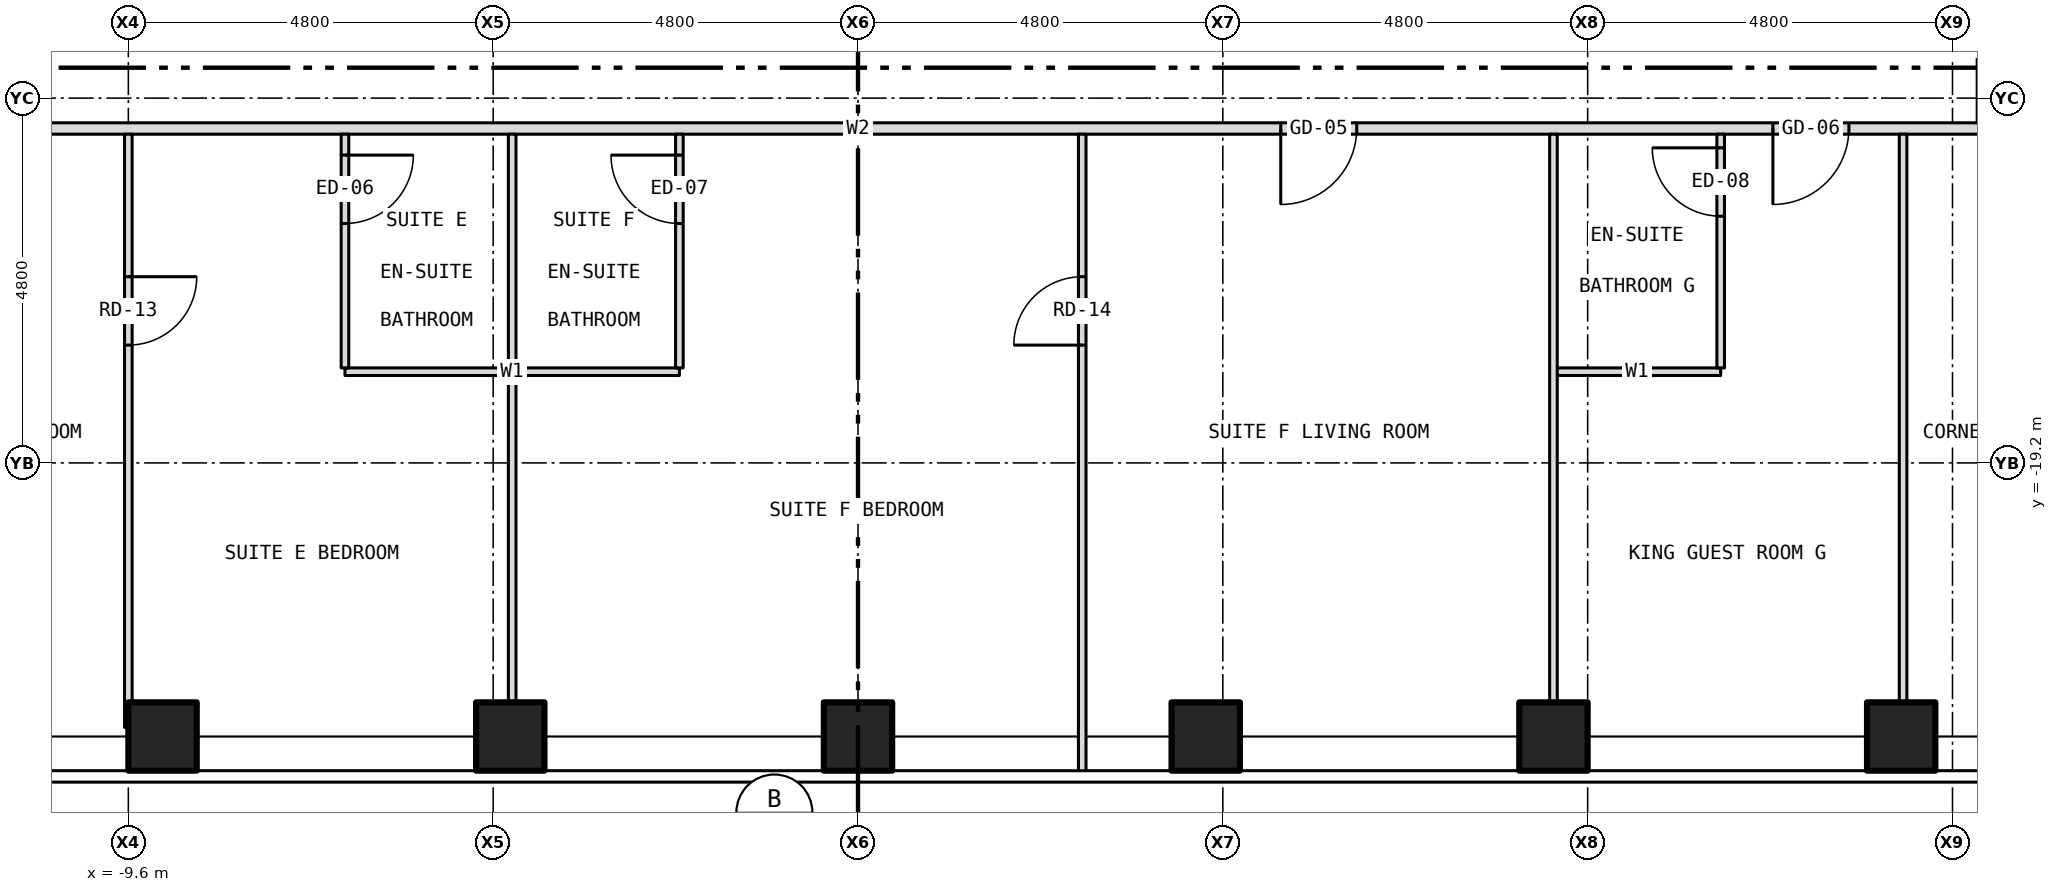
"""IFC4 building model, lengths in metres.
Left out: names, types, materials, properties, quantities, classifications, styles, units other than length and angle.
Written with IfcOpenShell. Run it as: python <this file> out.ifc"""

import sys

from ifc_helpers import new_model, si_unit, direction, frame, frame_2d, origin, origin_2d, place, context, subcontext, project, spatial, rectangle, hollow_rectangle, extrude, element, fill, save


model = new_model("IFC4")
c1 = context("Model", 3, precision=1e-05, world=origin(), true_north=direction((0.0, 1.0)))
c2 = subcontext(c1, "Body", "Model", "MODEL_VIEW")
j1 = project(units=[si_unit("LENGTHUNIT", "METRE"), si_unit("PLANEANGLEUNIT", "RADIAN")], contexts=[c1])
p1 = place(None, origin())
s1 = spatial("IfcSite", under=j1, at=p1, CompositionType="ELEMENT")
p2 = place(p1, origin())
s2 = spatial("IfcBuilding", under=s1, at=p2, CompositionType="ELEMENT")
p3 = place(p2, frame((0.0, 0.0, 106.5)))
s3 = spatial("IfcBuildingStorey", under=s2, at=p3, CompositionType="ELEMENT", Elevation=106.5)
for number, where, z_axis, x_axis in (
    (1, (-9.15, -22.8, -0.15), (0.0, 0.0, 1.0), (1.0, 0.0, 0.0)),
    (2, (-4.575, -22.8, -0.15), (0.0, 0.0, 1.0), (1.0, 0.0, 0.0)),
    (3, (0.0, -22.8, -0.15), (0.0, 0.0, 1.0), (1.0, 0.0, 0.0)),
    (4, (4.575, -22.8, -0.15), (0.0, 0.0, 1.0), (1.0, 0.0, 0.0)),
    (5, (9.15, -22.8, -0.15), (0.0, 0.0, 1.0), (1.0, 0.0, 0.0)),
    (6, (13.725, -22.8, -0.15), (0.0, 0.0, 1.0), (1.0, 0.0, 0.0)),
):
    element("IfcColumn", number, at=place(p3, frame(where, z_axis=z_axis, x_axis=x_axis)), inside=s3, PredefinedType="COLUMN", context=c2, shape_type="SweptSolid", body=[
        extrude(hollow_rectangle(XDim=0.9, YDim=0.9, WallThickness=0.05, at=origin_2d()), origin(), (0.0, 0.0, 1.0), 3.5),
    ])
p4 = place(p3, frame((-6.75, -18.0, 0.0), z_axis=(0.0, 0.0, 1.0), x_axis=(1.0, 0.0, 0.0)))
e7 = element("IfcWall", 7, at=p4, inside=s3, PredefinedType="PARTITIONING", context=c2, shape_type="SweptSolid", body=[
    extrude(rectangle(XDim=4.4, YDim=0.1, at=frame_2d((2.2, 0.0))), origin(), (0.0, 0.0, 1.0), 3.35),
])
p5 = place(p3, frame((9.15, -18.0, 0.0), z_axis=(0.0, 0.0, 1.0), x_axis=(1.0, 0.0, 0.0)))
e8 = element("IfcWall", 8, at=p5, inside=s3, PredefinedType="PARTITIONING", context=c2, shape_type="SweptSolid", body=[
    extrude(rectangle(XDim=2.2, YDim=0.1, at=frame_2d((1.1, 0.0))), origin(), (0.0, 0.0, 1.0), 3.35),
])
p6 = place(p3, frame((-14.8, -14.8, 0.0), z_axis=(0.0, 0.0, 1.0), x_axis=(1.0, 0.0, 0.0)))
e9 = element("IfcWall", 9, at=p6, inside=s3, PredefinedType="PARTITIONING", context=c2, shape_type="SweptSolid", body=[
    extrude(rectangle(XDim=29.6, YDim=0.15, at=frame_2d((14.8, 0.0))), origin(), (0.0, 0.0, 1.0), 3.35),
])
p7 = place(p6, frame((2.634, 0.0, 0.0)))
e10 = element("IfcOpeningElement", 10, at=p7, cuts=e9, PredefinedType="OPENING", context=c2, shape_type="SweptSolid", body=[
    extrude(rectangle(XDim=1.0, YDim=2.1, at=frame_2d((0.5, 1.05))), frame((0.0, 0.087, 0.0), z_axis=(0.0, -1.0, 0.0), x_axis=(1.0, 0.0, 0.0)), (0.0, 0.0, 1.0), 0.174),
])
p8 = place(p6, frame((20.362, 0.0, 0.0)))
e11 = element("IfcOpeningElement", 11, at=p8, cuts=e9, PredefinedType="OPENING", context=c2, shape_type="SweptSolid", body=[
    extrude(rectangle(XDim=1.0, YDim=2.1, at=frame_2d((0.5, 1.05))), frame((0.0, 0.087, 0.0), z_axis=(0.0, -1.0, 0.0), x_axis=(1.0, 0.0, 0.0)), (0.0, 0.0, 1.0), 0.174),
])
p9 = place(p6, frame((26.837, 0.0, 0.0)))
e12 = element("IfcOpeningElement", 12, at=p9, cuts=e9, PredefinedType="OPENING", context=c2, shape_type="SweptSolid", body=[
    extrude(rectangle(XDim=1.0, YDim=2.1, at=frame_2d((0.5, 1.05))), frame((0.0, 0.087, 0.0), z_axis=(0.0, -1.0, 0.0), x_axis=(1.0, 0.0, 0.0)), (0.0, 0.0, 1.0), 0.174),
])
p10 = place(p3, frame((-9.6, -22.68, 0.0), z_axis=(0.0, 0.0, 1.0), x_axis=(0.0, 1.0, 0.0)))
e13 = element("IfcWall", 13, at=p10, inside=s3, PredefinedType="PARTITIONING", context=c2, shape_type="SweptSolid", body=[
    extrude(rectangle(XDim=0.33, YDim=0.1, at=frame_2d((0.165, 0.0))), origin(), (0.0, 0.0, 1.0), 3.35),
])
p11 = place(p3, frame((-9.6, -22.35, 0.0), z_axis=(0.0, 0.0, 1.0), x_axis=(0.0, 1.0, 0.0)))
e14 = element("IfcWall", 14, at=p11, inside=s3, PredefinedType="PARTITIONING", context=c2, shape_type="SweptSolid", body=[
    extrude(rectangle(XDim=7.475, YDim=0.1, at=frame_2d((3.738, 0.0))), origin(), (0.0, 0.0, 1.0), 2.728),
])
p12 = place(p11, frame((4.7, 0.0, 0.0)))
e15 = element("IfcOpeningElement", 15, at=p12, cuts=e14, PredefinedType="OPENING", context=c2, shape_type="SweptSolid", body=[
    extrude(rectangle(XDim=0.9, YDim=2.1, at=frame_2d((0.45, 1.05))), frame((0.0, 0.062, 0.0), z_axis=(0.0, -1.0, 0.0), x_axis=(1.0, 0.0, 0.0)), (0.0, 0.0, 1.0), 0.124),
])
p13 = place(p3, frame((-6.75, -17.95, 0.0), z_axis=(0.0, 0.0, 1.0), x_axis=(0.0, 1.0, 0.0)))
e16 = element("IfcWall", 16, at=p13, inside=s3, PredefinedType="PARTITIONING", context=c2, shape_type="SweptSolid", body=[
    extrude(rectangle(XDim=3.075, YDim=0.1, at=frame_2d((1.538, 0.0))), origin(), (0.0, 0.0, 1.0), 3.35),
])
p14 = place(p13, frame((1.9, 0.0, 0.0)))
e17 = element("IfcOpeningElement", 17, at=p14, cuts=e16, PredefinedType="OPENING", context=c2, shape_type="SweptSolid", body=[
    extrude(rectangle(XDim=0.9, YDim=2.1, at=frame_2d((0.45, 1.05))), frame((0.0, 0.062, 0.0), z_axis=(0.0, -1.0, 0.0), x_axis=(1.0, 0.0, 0.0)), (0.0, 0.0, 1.0), 0.124),
])
p15 = place(p3, frame((-4.55, -22.68, 0.0), z_axis=(0.0, 0.0, 1.0), x_axis=(0.0, 1.0, 0.0)))
e18 = element("IfcWall", 18, at=p15, inside=s3, PredefinedType="PARTITIONING", context=c2, shape_type="SweptSolid", body=[
    extrude(rectangle(XDim=4.63, YDim=0.1, at=frame_2d((2.315, 0.0))), origin(), (0.0, 0.0, 1.0), 3.35),
])
p16 = place(p3, frame((-4.55, -17.95, 0.0), z_axis=(0.0, 0.0, 1.0), x_axis=(0.0, 1.0, 0.0)))
e19 = element("IfcWall", 19, at=p16, inside=s3, PredefinedType="PARTITIONING", context=c2, shape_type="SweptSolid", body=[
    extrude(rectangle(XDim=3.075, YDim=0.1, at=frame_2d((1.538, 0.0))), origin(), (0.0, 0.0, 1.0), 3.35),
])
p17 = place(p3, frame((-2.35, -17.95, 0.0), z_axis=(0.0, 0.0, 1.0), x_axis=(0.0, 1.0, 0.0)))
e20 = element("IfcWall", 20, at=p17, inside=s3, PredefinedType="PARTITIONING", context=c2, shape_type="SweptSolid", body=[
    extrude(rectangle(XDim=3.075, YDim=0.1, at=frame_2d((1.538, 0.0))), origin(), (0.0, 0.0, 1.0), 3.35),
])
p18 = place(p17, frame((1.9, 0.0, 0.0)))
e21 = element("IfcOpeningElement", 21, at=p18, cuts=e20, PredefinedType="OPENING", context=c2, shape_type="SweptSolid", body=[
    extrude(rectangle(XDim=0.9, YDim=2.1, at=frame_2d((0.45, 1.05))), frame((0.0, 0.062, 0.0), z_axis=(0.0, -1.0, 0.0), x_axis=(1.0, 0.0, 0.0)), (0.0, 0.0, 1.0), 0.124),
])
p19 = place(p3, frame((2.95, -23.28, 0.0), z_axis=(0.0, 0.0, 1.0), x_axis=(0.0, 1.0, 0.0)))
e22 = element("IfcWall", 22, at=p19, inside=s3, PredefinedType="PARTITIONING", context=c2, shape_type="SweptSolid", body=[
    extrude(rectangle(XDim=8.405, YDim=0.1, at=frame_2d((4.203, 0.0))), origin(), (0.0, 0.0, 1.0), 3.35),
])
p20 = place(p19, frame((5.63, 0.0, 0.0)))
e23 = element("IfcOpeningElement", 23, at=p20, cuts=e22, PredefinedType="OPENING", context=c2, shape_type="SweptSolid", body=[
    extrude(rectangle(XDim=0.9, YDim=2.1, at=frame_2d((0.45, 1.05))), frame((0.0, 0.062, 0.0), z_axis=(0.0, -1.0, 0.0), x_axis=(1.0, 0.0, 0.0)), (0.0, 0.0, 1.0), 0.124),
])
p21 = place(p3, frame((9.15, -22.68, 0.0), z_axis=(0.0, 0.0, 1.0), x_axis=(0.0, 1.0, 0.0)))
e24 = element("IfcWall", 24, at=p21, inside=s3, PredefinedType="PARTITIONING", context=c2, shape_type="SweptSolid", body=[
    extrude(rectangle(XDim=7.805, YDim=0.1, at=frame_2d((3.902, 0.0))), origin(), (0.0, 0.0, 1.0), 3.35),
])
p22 = place(p3, frame((11.35, -17.95, 0.0), z_axis=(0.0, 0.0, 1.0), x_axis=(0.0, 1.0, 0.0)))
e25 = element("IfcWall", 25, at=p22, inside=s3, PredefinedType="PARTITIONING", context=c2, shape_type="SweptSolid", body=[
    extrude(rectangle(XDim=3.075, YDim=0.1, at=frame_2d((1.538, 0.0))), origin(), (0.0, 0.0, 1.0), 3.35),
])
p23 = place(p22, frame((1.996, 0.0, 0.0)))
e26 = element("IfcOpeningElement", 26, at=p23, cuts=e25, PredefinedType="OPENING", context=c2, shape_type="SweptSolid", body=[
    extrude(rectangle(XDim=0.9, YDim=2.1, at=frame_2d((0.45, 1.05))), frame((0.0, 0.062, 0.0), z_axis=(0.0, -1.0, 0.0), x_axis=(1.0, 0.0, 0.0)), (0.0, 0.0, 1.0), 0.124),
])
p24 = place(p3, frame((13.75, -22.68, 0.0), z_axis=(0.0, 0.0, 1.0), x_axis=(0.0, 1.0, 0.0)))
e27 = element("IfcWall", 27, at=p24, inside=s3, PredefinedType="PARTITIONING", context=c2, shape_type="SweptSolid", body=[
    extrude(rectangle(XDim=7.805, YDim=0.1, at=frame_2d((3.902, 0.0))), origin(), (0.0, 0.0, 1.0), 3.35),
])
p25 = place(p12, origin())
e28 = element("IfcDoor", 28, at=p25, inside=s3, OperationType="SINGLE_SWING_RIGHT", PredefinedType="DOOR", context=c2, shape_type="SweptSolid", body=[
    extrude(rectangle(XDim=0.9, YDim=2.1, at=frame_2d((0.45, 1.05))), frame((0.0, 0.025, 0.0), z_axis=(0.0, -1.0, 0.0), x_axis=(1.0, 0.0, 0.0)), (0.0, 0.0, 1.0), 0.05),
])
fill(e15, e28)
p26 = place(p14, origin())
e29 = element("IfcDoor", 29, at=p26, inside=s3, OperationType="SINGLE_SWING_RIGHT", PredefinedType="DOOR", context=c2, shape_type="SweptSolid", body=[
    extrude(rectangle(XDim=0.9, YDim=2.1, at=frame_2d((0.45, 1.05))), frame((0.0, 0.025, 0.0), z_axis=(0.0, -1.0, 0.0), x_axis=(1.0, 0.0, 0.0)), (0.0, 0.0, 1.0), 0.05),
])
fill(e17, e29)
p27 = place(p8, origin())
e30 = element("IfcDoor", 30, at=p27, inside=s3, OperationType="SINGLE_SWING_LEFT", PredefinedType="DOOR", context=c2, shape_type="SweptSolid", body=[
    extrude(rectangle(XDim=1.0, YDim=2.1, at=frame_2d((0.5, 1.05))), frame((0.0, 0.025, 0.0), z_axis=(0.0, -1.0, 0.0), x_axis=(1.0, 0.0, 0.0)), (0.0, 0.0, 1.0), 0.05),
])
fill(e11, e30)
p28 = place(p20, origin())
e31 = element("IfcDoor", 31, at=p28, inside=s3, OperationType="SINGLE_SWING_LEFT", PredefinedType="DOOR", context=c2, shape_type="SweptSolid", body=[
    extrude(rectangle(XDim=0.9, YDim=2.1, at=frame_2d((0.45, 1.05))), frame((0.0, 0.025, 0.0), z_axis=(0.0, -1.0, 0.0), x_axis=(1.0, 0.0, 0.0)), (0.0, 0.0, 1.0), 0.05),
])
fill(e23, e31)
p29 = place(p18, origin())
e32 = element("IfcDoor", 32, at=p29, inside=s3, OperationType="SINGLE_SWING_RIGHT", PredefinedType="DOOR", context=c2, shape_type="SweptSolid", body=[
    extrude(rectangle(XDim=0.9, YDim=2.1, at=frame_2d((0.45, 1.05))), frame((0.0, 0.025, 0.0), z_axis=(0.0, -1.0, 0.0), x_axis=(1.0, 0.0, 0.0)), (0.0, 0.0, 1.0), 0.05),
])
fill(e21, e32)
p30 = place(p9, origin())
e33 = element("IfcDoor", 33, at=p30, inside=s3, OperationType="SINGLE_SWING_LEFT", PredefinedType="DOOR", context=c2, shape_type="SweptSolid", body=[
    extrude(rectangle(XDim=1.0, YDim=2.1, at=frame_2d((0.5, 1.05))), frame((0.0, 0.025, 0.0), z_axis=(0.0, -1.0, 0.0), x_axis=(1.0, 0.0, 0.0)), (0.0, 0.0, 1.0), 0.05),
])
fill(e12, e33)
p31 = place(p23, origin())
e34 = element("IfcDoor", 34, at=p31, inside=s3, OperationType="SINGLE_SWING_RIGHT", PredefinedType="DOOR", context=c2, shape_type="SweptSolid", body=[
    extrude(rectangle(XDim=0.9, YDim=2.1, at=frame_2d((0.45, 1.05))), frame((0.0, 0.025, 0.0), z_axis=(0.0, -1.0, 0.0), x_axis=(1.0, 0.0, 0.0)), (0.0, 0.0, 1.0), 0.05),
])
fill(e26, e34)
save(model, sys.argv[1])
